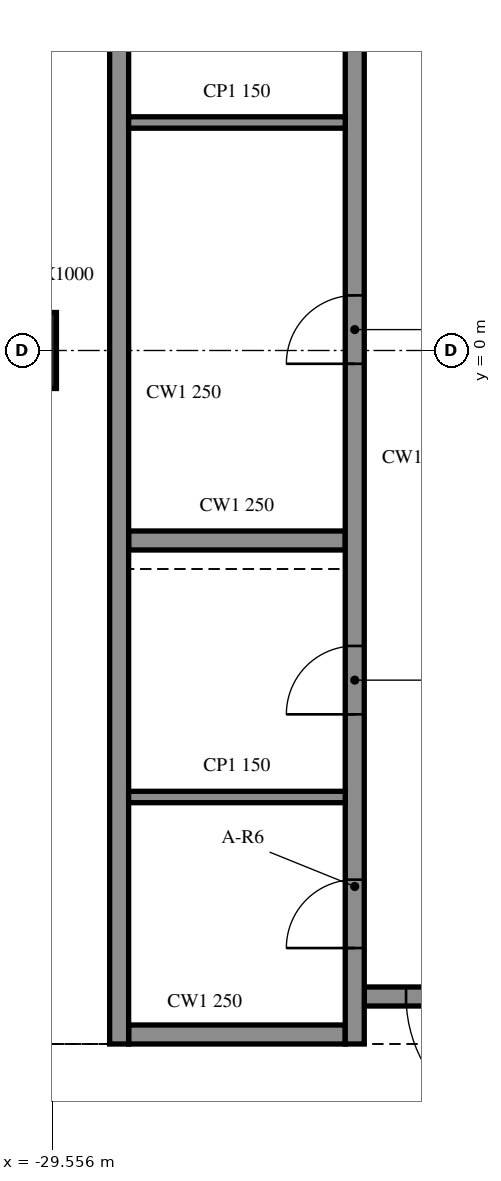
"""IFC4 building model, lengths in metres.
Left out: names, types, materials, properties, quantities, classifications, styles, units other than length and angle.
Written with IfcOpenShell. Run it as: python <this file> out.ifc"""

import sys

from ifc_helpers import new_model, si_unit, direction, frame, frame_2d, origin, origin_2d, place, context, subcontext, project, spatial, rectangle, extrude, element, fill, save


model = new_model("IFC4")
c1 = context("Model", 3, precision=1e-05, world=origin(), true_north=direction((0.0, 1.0)))
c2 = subcontext(c1, "Body", "Model", "MODEL_VIEW")
j1 = project(units=[si_unit("LENGTHUNIT", "METRE"), si_unit("PLANEANGLEUNIT", "RADIAN")], contexts=[c1])
p1 = place(None, origin())
s1 = spatial("IfcSite", under=j1, at=p1, CompositionType="ELEMENT")
p2 = place(p1, origin())
s2 = spatial("IfcBuilding", under=s1, at=p2, CompositionType="ELEMENT")
p3 = place(p2, frame((0.0, 0.0, 259.0)))
s3 = spatial("IfcBuildingStorey", under=s2, at=p3, CompositionType="ELEMENT", Elevation=259.0)
p4 = place(p3, frame((-30.0, 0.0, -0.4), z_axis=(0.0, 0.0, 1.0), x_axis=(1.0, 0.0, 0.0)))
e1 = element("IfcColumn", 1, at=p4, inside=s3, PredefinedType="COLUMN", context=c2, shape_type="SweptSolid", body=[
    extrude(rectangle(XDim=1.0, YDim=1.0, at=origin_2d()), origin(), (0.0, 0.0, 1.0), 4.36),
])
p5 = place(p3, frame((-28.675, 15.125, 0.0), z_axis=(0.0, 0.0, 1.0), x_axis=(0.0, -1.0, 0.0)))
e2 = element("IfcWall", 2, at=p5, inside=s3, PredefinedType="SOLIDWALL", context=c2, shape_type="SweptSolid", body=[
    extrude(rectangle(XDim=24.25, YDim=0.25, at=frame_2d((12.125, 0.0))), origin(), (0.0, 0.0, 1.0), 3.96),
])
p6 = place(p3, frame((-25.7, -9.0, 0.0), z_axis=(0.0, 0.0, 1.0), x_axis=(-1.0, 0.0, 0.0)))
e3 = element("IfcWall", 3, at=p6, inside=s3, PredefinedType="SOLIDWALL", context=c2, shape_type="SweptSolid", body=[
    extrude(rectangle(XDim=2.85, YDim=0.25, at=frame_2d((1.425, 0.0))), origin(), (0.0, 0.0, 1.0), 3.96),
])
p7 = place(p3, frame((-22.55, -8.5, 0.0), z_axis=(0.0, 0.0, 1.0), x_axis=(-1.0, 0.0, 0.0)))
e4 = element("IfcWall", 4, at=p7, inside=s3, PredefinedType="SOLIDWALL", context=c2, shape_type="SweptSolid", body=[
    extrude(rectangle(XDim=2.9, YDim=0.25, at=frame_2d((1.45, 0.0))), origin(), (0.0, 0.0, 1.0), 3.96),
])
p8 = place(p7, frame((0.55, 0.0, 0.0)))
e5 = element("IfcOpeningElement", 5, at=p8, cuts=e4, PredefinedType="OPENING", context=c2, shape_type="SweptSolid", body=[
    extrude(rectangle(XDim=1.8, YDim=2.1, at=frame_2d((0.9, 1.05))), frame((0.0, 0.135, 0.0), z_axis=(0.0, -1.0, 0.0), x_axis=(1.0, 0.0, 0.0)), (0.0, 0.0, 1.0), 0.27),
])
p9 = place(p3, frame((-25.575, -9.125, 0.0), z_axis=(0.0, 0.0, 1.0), x_axis=(0.0, 1.0, 0.0)))
e6 = element("IfcWall", 6, at=p9, inside=s3, PredefinedType="SOLIDWALL", context=c2, shape_type="SweptSolid", body=[
    extrude(rectangle(XDim=17.75, YDim=0.25, at=frame_2d((8.875, 0.0))), origin(), (0.0, 0.0, 1.0), 3.96),
])
p10 = place(p9, frame((8.95, 0.0, 0.0)))
e7 = element("IfcOpeningElement", 7, at=p10, cuts=e6, PredefinedType="OPENING", context=c2, shape_type="SweptSolid", body=[
    extrude(rectangle(XDim=0.9, YDim=2.1, at=frame_2d((0.45, 1.05))), frame((0.0, 0.135, 0.0), z_axis=(0.0, -1.0, 0.0), x_axis=(1.0, 0.0, 0.0)), (0.0, 0.0, 1.0), 0.27),
])
p11 = place(p9, frame((14.4, 0.0, 0.0)))
e8 = element("IfcOpeningElement", 8, at=p11, cuts=e6, PredefinedType="OPENING", context=c2, shape_type="SweptSolid", body=[
    extrude(rectangle(XDim=0.9, YDim=2.1, at=frame_2d((0.45, 1.05))), frame((0.0, 0.135, 0.0), z_axis=(0.0, -1.0, 0.0), x_axis=(1.0, 0.0, 0.0)), (0.0, 0.0, 1.0), 0.27),
])
p12 = place(p9, frame((1.262, 0.0, 0.0)))
e9 = element("IfcOpeningElement", 9, at=p12, cuts=e6, PredefinedType="OPENING", context=c2, shape_type="SweptSolid", body=[
    extrude(rectangle(XDim=0.9, YDim=2.1, at=frame_2d((0.45, 1.05))), frame((0.0, 0.135, 0.0), z_axis=(0.0, -1.0, 0.0), x_axis=(1.0, 0.0, 0.0)), (0.0, 0.0, 1.0), 0.27),
])
p13 = place(p9, frame((4.337, 0.0, 0.0)))
e10 = element("IfcOpeningElement", 10, at=p13, cuts=e6, PredefinedType="OPENING", context=c2, shape_type="SweptSolid", body=[
    extrude(rectangle(XDim=0.9, YDim=2.1, at=frame_2d((0.45, 1.05))), frame((0.0, 0.135, 0.0), z_axis=(0.0, -1.0, 0.0), x_axis=(1.0, 0.0, 0.0)), (0.0, 0.0, 1.0), 0.27),
])
p14 = place(p3, frame((-28.55, -2.5, 0.0), z_axis=(0.0, 0.0, 1.0), x_axis=(1.0, 0.0, 0.0)))
e11 = element("IfcWall", 11, at=p14, inside=s3, PredefinedType="SOLIDWALL", context=c2, shape_type="SweptSolid", body=[
    extrude(rectangle(XDim=2.85, YDim=0.25, at=frame_2d((1.425, 0.0))), origin(), (0.0, 0.0, 1.0), 3.96),
])
for number, where, z_axis, x_axis in (
    (12, (-28.55, 3.0, 0.0), (0.0, 0.0, 1.0), (1.0, 0.0, 0.0)),
    (13, (-28.55, -5.875, 0.0), (0.0, 0.0, 1.0), (1.0, 0.0, 0.0)),
):
    element("IfcWall", number, at=place(p3, frame(where, z_axis=z_axis, x_axis=x_axis)), inside=s3, PredefinedType="PARTITIONING", context=c2, shape_type="SweptSolid", body=[
        extrude(rectangle(XDim=2.85, YDim=0.15, at=frame_2d((1.425, 0.0))), origin(), (0.0, 0.0, 1.0), 3.96),
    ])
p15 = place(p8, origin())
e14 = element("IfcDoor", 14, at=p15, inside=s3, OperationType="DOUBLE_DOOR_SINGLE_SWING", PredefinedType="DOOR", context=c2, shape_type="SweptSolid", body=[
    extrude(rectangle(XDim=1.8, YDim=2.1, at=frame_2d((0.9, 1.05))), frame((0.0, 0.025, 0.0), z_axis=(0.0, -1.0, 0.0), x_axis=(1.0, 0.0, 0.0)), (0.0, 0.0, 1.0), 0.05),
])
fill(e5, e14)
p16 = place(p10, origin())
e15 = element("IfcDoor", 15, at=p16, inside=s3, OperationType="SINGLE_SWING_LEFT", PredefinedType="DOOR", context=c2, shape_type="SweptSolid", body=[
    extrude(rectangle(XDim=0.9, YDim=2.1, at=frame_2d((0.45, 1.05))), frame((0.0, 0.025, 0.0), z_axis=(0.0, -1.0, 0.0), x_axis=(1.0, 0.0, 0.0)), (0.0, 0.0, 1.0), 0.05),
])
fill(e7, e15)
p17 = place(p12, origin())
e16 = element("IfcDoor", 16, at=p17, inside=s3, OperationType="SINGLE_SWING_RIGHT", PredefinedType="DOOR", context=c2, shape_type="SweptSolid", body=[
    extrude(rectangle(XDim=0.9, YDim=2.1, at=frame_2d((0.45, 1.05))), frame((0.0, 0.025, 0.0), z_axis=(0.0, -1.0, 0.0), x_axis=(1.0, 0.0, 0.0)), (0.0, 0.0, 1.0), 0.05),
])
fill(e9, e16)
p18 = place(p13, origin())
e17 = element("IfcDoor", 17, at=p18, inside=s3, OperationType="SINGLE_SWING_LEFT", PredefinedType="DOOR", context=c2, shape_type="SweptSolid", body=[
    extrude(rectangle(XDim=0.9, YDim=2.1, at=frame_2d((0.45, 1.05))), frame((0.0, 0.025, 0.0), z_axis=(0.0, -1.0, 0.0), x_axis=(1.0, 0.0, 0.0)), (0.0, 0.0, 1.0), 0.05),
])
fill(e10, e17)
save(model, sys.argv[1])
